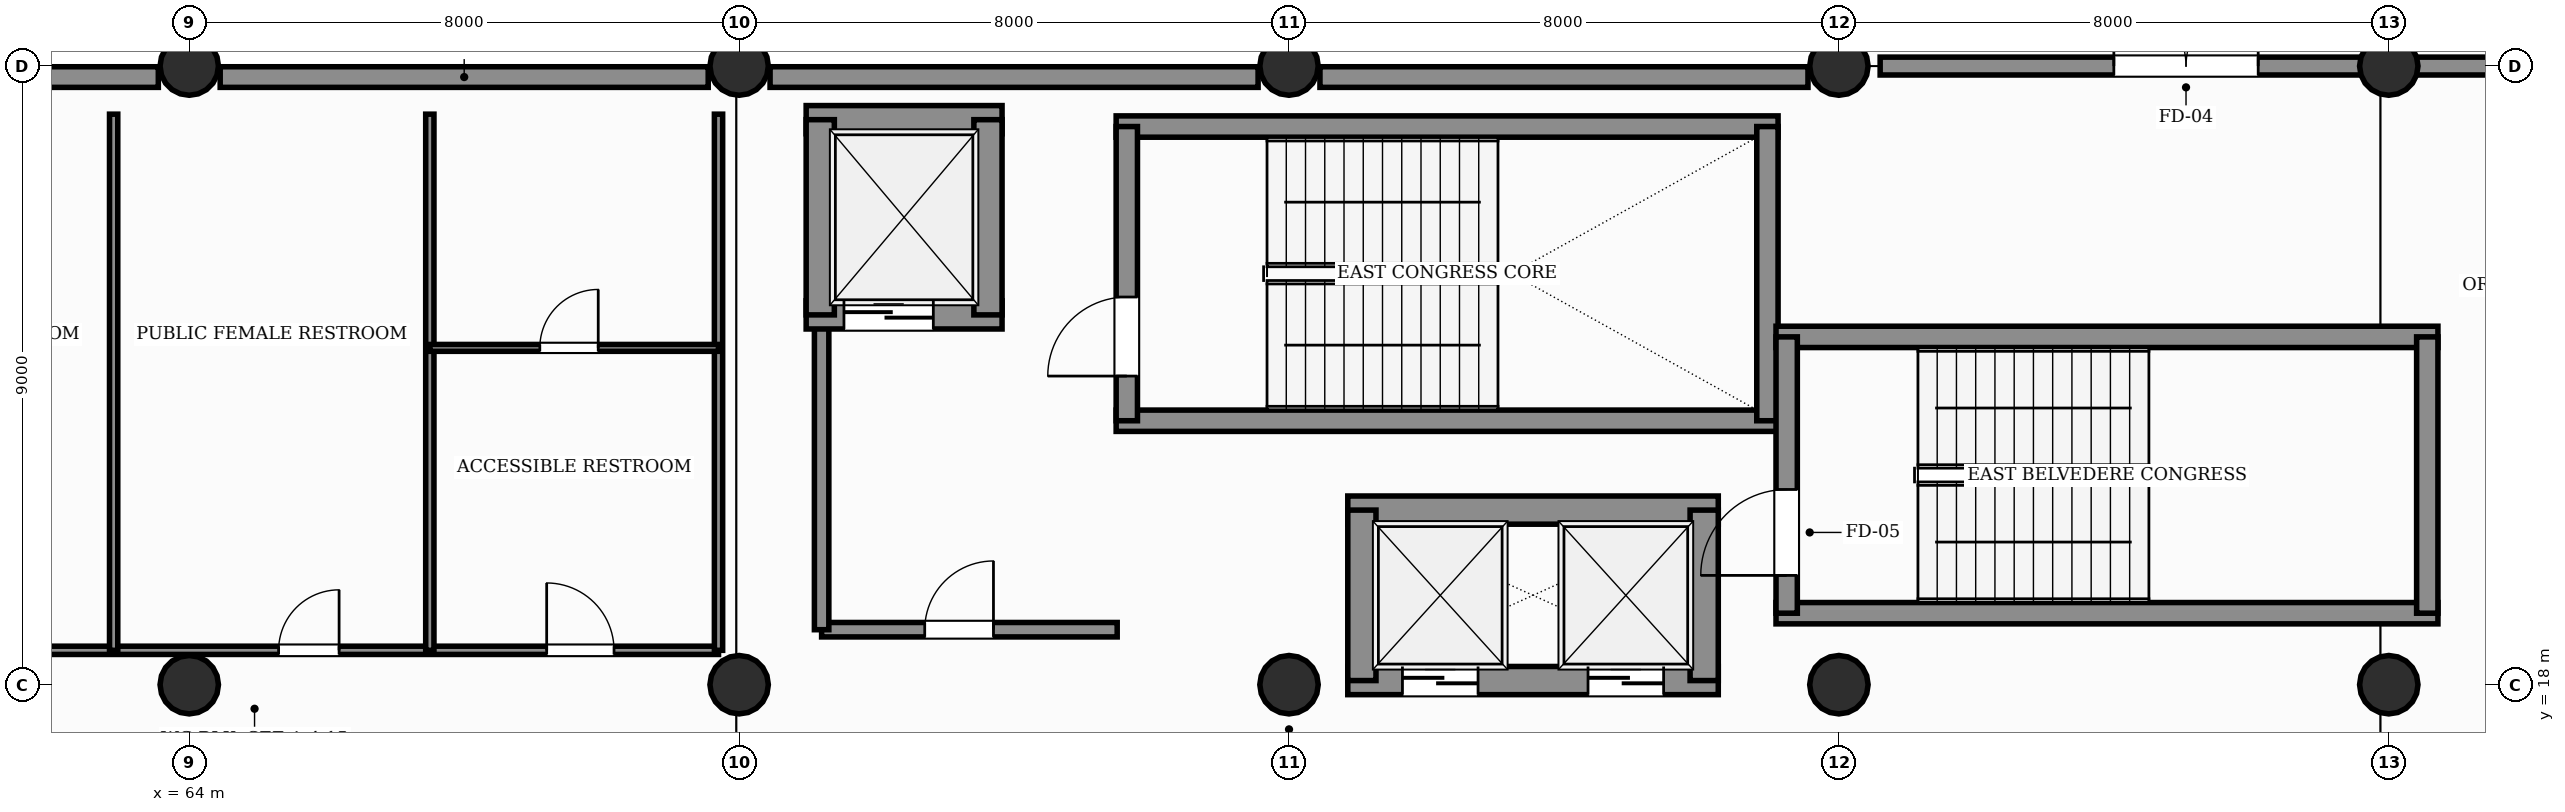
"""IFC4 building model, lengths in metres.
Left out: names, types, materials, properties, quantities, classifications, styles, units other than length and angle.
Written with IfcOpenShell. Run it as: python <this file> out.ifc"""

import sys

from ifc_helpers import new_model, si_unit, direction, frame, frame_2d, origin, origin_2d, place, context, subcontext, project, spatial, rectangle, circle, extrude, element, fill, save


model = new_model("IFC4")
c1 = context("Model", 3, precision=1e-05, world=origin(), true_north=direction((0.0, 1.0)))
c2 = subcontext(c1, "Body", "Model", "MODEL_VIEW")
j1 = project(units=[si_unit("LENGTHUNIT", "METRE"), si_unit("PLANEANGLEUNIT", "RADIAN")], contexts=[c1])
p1 = place(None, origin())
s1 = spatial("IfcSite", under=j1, at=p1, CompositionType="ELEMENT")
p2 = place(p1, origin())
s2 = spatial("IfcBuilding", under=s1, at=p2, CompositionType="ELEMENT")
p3 = place(p2, frame((0.0, 0.0, 11.4)))
s3 = spatial("IfcBuildingStorey", under=s2, at=p3, CompositionType="ELEMENT", Elevation=11.4)
for number, where, z_axis, x_axis in (
    (1, (64.0, 18.0, 0.0), (0.0, 0.0, 1.0), (1.0, 0.0, 0.0)),
    (2, (64.0, 27.0, 0.0), (0.0, 0.0, 1.0), (1.0, 0.0, 0.0)),
    (3, (72.0, 18.0, 0.0), (0.0, 0.0, 1.0), (1.0, 0.0, 0.0)),
    (4, (72.0, 27.0, 0.0), (0.0, 0.0, 1.0), (1.0, 0.0, 0.0)),
    (5, (80.0, 18.0, 0.0), (0.0, 0.0, 1.0), (1.0, 0.0, 0.0)),
    (6, (80.0, 27.0, 0.0), (0.0, 0.0, 1.0), (1.0, 0.0, 0.0)),
    (7, (88.0, 18.0, 0.0), (0.0, 0.0, 1.0), (1.0, 0.0, 0.0)),
    (8, (88.0, 27.0, 0.0), (0.0, 0.0, 1.0), (1.0, 0.0, 0.0)),
    (9, (96.0, 18.0, 0.0), (0.0, 0.0, 1.0), (1.0, 0.0, 0.0)),
    (10, (96.0, 27.0, 0.0), (0.0, 0.0, 1.0), (1.0, 0.0, 0.0)),
):
    element("IfcColumn", number, at=place(p3, frame(where, z_axis=z_axis, x_axis=x_axis)), inside=s3, PredefinedType="COLUMN", context=c2, shape_type="SweptSolid", body=[
        extrude(circle(Radius=0.425, at=origin_2d()), origin(), (0.0, 0.0, 1.0), 4.8),
    ])
for number, where, z_axis, x_axis in (
    (11, (56.45, 26.84, 0.0), (0.0, 0.0, 1.0), (1.0, 0.0, 0.0)),
    (12, (64.45, 26.84, 0.0), (0.0, 0.0, 1.0), (1.0, 0.0, 0.0)),
    (13, (72.45, 26.84, 0.0), (0.0, 0.0, 1.0), (1.0, 0.0, 0.0)),
    (14, (80.45, 26.84, 0.0), (0.0, 0.0, 1.0), (1.0, 0.0, 0.0)),
):
    element("IfcWall", number, at=place(p3, frame(where, z_axis=z_axis, x_axis=x_axis)), inside=s3, PredefinedType="SOLIDWALL", context=c2, shape_type="SweptSolid", body=[
        extrude(rectangle(XDim=7.1, YDim=0.3, at=frame_2d((3.55, 0.0))), origin(), (0.0, 0.0, 1.0), 3.59),
    ])
for number, where, z_axis, x_axis in (
    (15, (77.485, 21.84, 0.0), (0.0, 0.0, 1.0), (1.0, 0.0, 0.0)),
    (16, (77.485, 26.12, 0.0), (0.0, 0.0, 1.0), (1.0, 0.0, 0.0)),
):
    element("IfcWall", number, at=place(p3, frame(where, z_axis=z_axis, x_axis=x_axis)), inside=s3, PredefinedType="SHEAR", context=c2, shape_type="SweptSolid", body=[
        extrude(rectangle(XDim=9.63, YDim=0.31, at=frame_2d((4.815, 0.0))), origin(), (0.0, 0.0, 1.0), 4.8),
    ])
p4 = place(p3, frame((77.64, 21.84, 0.0), z_axis=(0.0, 0.0, 1.0), x_axis=(0.0, 1.0, 0.0)))
e17 = element("IfcWall", 17, at=p4, inside=s3, PredefinedType="SHEAR", context=c2, shape_type="SweptSolid", body=[
    extrude(rectangle(XDim=4.28, YDim=0.31, at=frame_2d((2.14, 0.0))), origin(), (0.0, 0.0, 1.0), 4.8),
])
p5 = place(p4, frame((0.65, 0.0, 0.0)))
e18 = element("IfcOpeningElement", 18, at=p5, cuts=e17, PredefinedType="OPENING", context=c2, shape_type="SweptSolid", body=[
    extrude(rectangle(XDim=1.15, YDim=2.2, at=frame_2d((0.575, 1.1))), frame((0.0, 0.165, 0.0), z_axis=(0.0, -1.0, 0.0), x_axis=(1.0, 0.0, 0.0)), (0.0, 0.0, 1.0), 0.33),
])
p6 = place(p3, frame((86.96, 21.84, 0.0), z_axis=(0.0, 0.0, 1.0), x_axis=(0.0, 1.0, 0.0)))
e19 = element("IfcWall", 19, at=p6, inside=s3, PredefinedType="SHEAR", context=c2, shape_type="SweptSolid", body=[
    extrude(rectangle(XDim=4.28, YDim=0.31, at=frame_2d((2.14, 0.0))), origin(), (0.0, 0.0, 1.0), 4.8),
])
p7 = place(p3, frame((73.2, 18.8, 0.0), z_axis=(0.0, 0.0, 1.0), x_axis=(1.0, 0.0, 0.0)))
e20 = element("IfcWall", 20, at=p7, inside=s3, PredefinedType="PARTITIONING", context=c2, shape_type="SweptSolid", body=[
    extrude(rectangle(XDim=4.3, YDim=0.21, at=frame_2d((2.15, 0.0))), origin(), (0.0, 0.0, 1.0), 3.4),
])
p8 = place(p7, frame((1.5, 0.0, 0.0)))
e21 = element("IfcOpeningElement", 21, at=p8, cuts=e20, PredefinedType="OPENING", context=c2, shape_type="SweptSolid", body=[
    extrude(rectangle(XDim=1.0, YDim=2.15, at=frame_2d((0.5, 1.075))), frame((0.0, 0.115, 0.0), z_axis=(0.0, -1.0, 0.0), x_axis=(1.0, 0.0, 0.0)), (0.0, 0.0, 1.0), 0.23),
])
p9 = place(p3, frame((73.2, 18.8, 0.0), z_axis=(0.0, 0.0, 1.0), x_axis=(0.0, 1.0, 0.0)))
e22 = element("IfcWall", 22, at=p9, inside=s3, PredefinedType="PARTITIONING", context=c2, shape_type="SweptSolid", body=[
    extrude(rectangle(XDim=4.6, YDim=0.21, at=frame_2d((2.3, 0.0))), origin(), (0.0, 0.0, 1.0), 3.4),
])
p10 = place(p3, frame((72.975, 23.38, 0.0), z_axis=(0.0, 0.0, 1.0), x_axis=(1.0, 0.0, 0.0)))
e23 = element("IfcWall", 23, at=p10, inside=s3, PredefinedType="SHEAR", context=c2, shape_type="SweptSolid", body=[
    extrude(rectangle(XDim=2.85, YDim=0.41, at=frame_2d((1.425, 0.0))), origin(), (0.0, 0.0, 1.0), 4.8),
])
p11 = place(p10, frame((0.55, 0.0, 0.0)))
e24 = element("IfcOpeningElement", 24, at=p11, cuts=e23, PredefinedType="OPENING", context=c2, shape_type="SweptSolid", body=[
    extrude(rectangle(XDim=1.3, YDim=2.25, at=frame_2d((0.65, 1.125))), frame((0.0, 0.215, 0.0), z_axis=(0.0, -1.0, 0.0), x_axis=(1.0, 0.0, 0.0)), (0.0, 0.0, 1.0), 0.43),
])
p12 = place(p3, frame((72.975, 26.22, 0.0), z_axis=(0.0, 0.0, 1.0), x_axis=(1.0, 0.0, 0.0)))
e25 = element("IfcWall", 25, at=p12, inside=s3, PredefinedType="SHEAR", context=c2, shape_type="SweptSolid", body=[
    extrude(rectangle(XDim=2.85, YDim=0.41, at=frame_2d((1.425, 0.0))), origin(), (0.0, 0.0, 1.0), 4.8),
])
for number, where, z_axis, x_axis in (
    (26, (73.18, 23.38, 0.0), (0.0, 0.0, 1.0), (0.0, 1.0, 0.0)),
    (27, (75.62, 23.38, 0.0), (0.0, 0.0, 1.0), (0.0, 1.0, 0.0)),
):
    element("IfcWall", number, at=place(p3, frame(where, z_axis=z_axis, x_axis=x_axis)), inside=s3, PredefinedType="SHEAR", context=c2, shape_type="SweptSolid", body=[
        extrude(rectangle(XDim=2.84, YDim=0.41, at=frame_2d((1.42, 0.0))), origin(), (0.0, 0.0, 1.0), 4.8),
    ])
p13 = place(p3, frame((80.855, 18.06, 0.0), z_axis=(0.0, 0.0, 1.0), x_axis=(1.0, 0.0, 0.0)))
e28 = element("IfcWall", 28, at=p13, inside=s3, PredefinedType="SHEAR", context=c2, shape_type="SweptSolid", body=[
    extrude(rectangle(XDim=5.39, YDim=0.41, at=frame_2d((2.695, 0.0))), origin(), (0.0, 0.0, 1.0), 4.8),
])
p14 = place(p13, frame((0.795, 0.0, 0.0)))
e29 = element("IfcOpeningElement", 29, at=p14, cuts=e28, PredefinedType="OPENING", context=c2, shape_type="SweptSolid", body=[
    extrude(rectangle(XDim=1.1, YDim=2.2, at=frame_2d((0.55, 1.1))), frame((0.0, 0.215, 0.0), z_axis=(0.0, -1.0, 0.0), x_axis=(1.0, 0.0, 0.0)), (0.0, 0.0, 1.0), 0.43),
])
p15 = place(p13, frame((3.495, 0.0, 0.0)))
e30 = element("IfcOpeningElement", 30, at=p15, cuts=e28, PredefinedType="OPENING", context=c2, shape_type="SweptSolid", body=[
    extrude(rectangle(XDim=1.1, YDim=2.2, at=frame_2d((0.55, 1.1))), frame((0.0, 0.215, 0.0), z_axis=(0.0, -1.0, 0.0), x_axis=(1.0, 0.0, 0.0)), (0.0, 0.0, 1.0), 0.43),
])
p16 = place(p3, frame((80.855, 20.54, 0.0), z_axis=(0.0, 0.0, 1.0), x_axis=(1.0, 0.0, 0.0)))
e31 = element("IfcWall", 31, at=p16, inside=s3, PredefinedType="SHEAR", context=c2, shape_type="SweptSolid", body=[
    extrude(rectangle(XDim=5.39, YDim=0.41, at=frame_2d((2.695, 0.0))), origin(), (0.0, 0.0, 1.0), 4.8),
])
for number, where, z_axis, x_axis in (
    (32, (81.06, 18.06, 0.0), (0.0, 0.0, 1.0), (0.0, 1.0, 0.0)),
    (33, (86.04, 18.06, 0.0), (0.0, 0.0, 1.0), (0.0, 1.0, 0.0)),
):
    element("IfcWall", number, at=place(p3, frame(where, z_axis=z_axis, x_axis=x_axis)), inside=s3, PredefinedType="SHEAR", context=c2, shape_type="SweptSolid", body=[
        extrude(rectangle(XDim=2.48, YDim=0.41, at=frame_2d((1.24, 0.0))), origin(), (0.0, 0.0, 1.0), 4.8),
    ])
for number, where, z_axis, x_axis in (
    (34, (87.085, 19.04, 0.0), (0.0, 0.0, 1.0), (1.0, 0.0, 0.0)),
    (35, (87.085, 23.06, 0.0), (0.0, 0.0, 1.0), (1.0, 0.0, 0.0)),
):
    element("IfcWall", number, at=place(p3, frame(where, z_axis=z_axis, x_axis=x_axis)), inside=s3, PredefinedType="SHEAR", context=c2, shape_type="SweptSolid", body=[
        extrude(rectangle(XDim=9.63, YDim=0.31, at=frame_2d((4.815, 0.0))), origin(), (0.0, 0.0, 1.0), 4.8),
    ])
p17 = place(p3, frame((87.24, 19.04, 0.0), z_axis=(0.0, 0.0, 1.0), x_axis=(0.0, 1.0, 0.0)))
e36 = element("IfcWall", 36, at=p17, inside=s3, PredefinedType="SHEAR", context=c2, shape_type="SweptSolid", body=[
    extrude(rectangle(XDim=4.02, YDim=0.31, at=frame_2d((2.01, 0.0))), origin(), (0.0, 0.0, 1.0), 4.8),
])
p18 = place(p17, frame((0.55, 0.0, 0.0)))
e37 = element("IfcOpeningElement", 37, at=p18, cuts=e36, PredefinedType="OPENING", context=c2, shape_type="SweptSolid", body=[
    extrude(rectangle(XDim=1.25, YDim=2.2, at=frame_2d((0.625, 1.1))), frame((0.0, 0.165, 0.0), z_axis=(0.0, -1.0, 0.0), x_axis=(1.0, 0.0, 0.0)), (0.0, 0.0, 1.0), 0.33),
])
p19 = place(p3, frame((96.56, 19.04, 0.0), z_axis=(0.0, 0.0, 1.0), x_axis=(0.0, 1.0, 0.0)))
e38 = element("IfcWall", 38, at=p19, inside=s3, PredefinedType="SHEAR", context=c2, shape_type="SweptSolid", body=[
    extrude(rectangle(XDim=4.02, YDim=0.31, at=frame_2d((2.01, 0.0))), origin(), (0.0, 0.0, 1.0), 4.8),
])
p20 = place(p3, frame((58.3, 18.5, 0.0), z_axis=(0.0, 0.0, 1.0), x_axis=(1.0, 0.0, 0.0)))
e39 = element("IfcWall", 39, at=p20, inside=s3, PredefinedType="PARTITIONING", context=c2, shape_type="SweptSolid", body=[
    extrude(rectangle(XDim=13.4, YDim=0.12, at=frame_2d((6.7, 0.0))), origin(), (0.0, 0.0, 1.0), 3.4),
])
p21 = place(p20, frame((1.8, 0.0, 0.0)))
e40 = element("IfcOpeningElement", 40, at=p21, cuts=e39, PredefinedType="OPENING", context=c2, shape_type="SweptSolid", body=[
    extrude(rectangle(XDim=0.88, YDim=2.1, at=frame_2d((0.44, 1.05))), frame((0.0, 0.07, 0.0), z_axis=(0.0, -1.0, 0.0), x_axis=(1.0, 0.0, 0.0)), (0.0, 0.0, 1.0), 0.14),
])
p22 = place(p20, frame((7.0, 0.0, 0.0)))
e41 = element("IfcOpeningElement", 41, at=p22, cuts=e39, PredefinedType="OPENING", context=c2, shape_type="SweptSolid", body=[
    extrude(rectangle(XDim=0.88, YDim=2.1, at=frame_2d((0.44, 1.05))), frame((0.0, 0.07, 0.0), z_axis=(0.0, -1.0, 0.0), x_axis=(1.0, 0.0, 0.0)), (0.0, 0.0, 1.0), 0.14),
])
p23 = place(p20, frame((10.9, 0.0, 0.0)))
e42 = element("IfcOpeningElement", 42, at=p23, cuts=e39, PredefinedType="OPENING", context=c2, shape_type="SweptSolid", body=[
    extrude(rectangle(XDim=0.98, YDim=2.15, at=frame_2d((0.49, 1.075))), frame((0.0, 0.07, 0.0), z_axis=(0.0, -1.0, 0.0), x_axis=(1.0, 0.0, 0.0)), (0.0, 0.0, 1.0), 0.14),
])
for number, where, z_axis, x_axis in (
    (43, (62.9, 18.5, 0.0), (0.0, 0.0, 1.0), (0.0, 1.0, 0.0)),
    (44, (67.5, 18.5, 0.0), (0.0, 0.0, 1.0), (0.0, 1.0, 0.0)),
    (45, (71.7, 18.5, 0.0), (0.0, 0.0, 1.0), (0.0, 1.0, 0.0)),
):
    element("IfcWall", number, at=place(p3, frame(where, z_axis=z_axis, x_axis=x_axis)), inside=s3, PredefinedType="PARTITIONING", context=c2, shape_type="SweptSolid", body=[
        extrude(rectangle(XDim=7.8, YDim=0.12, at=frame_2d((3.9, 0.0))), origin(), (0.0, 0.0, 1.0), 3.4),
    ])
p24 = place(p3, frame((67.5, 22.9, 0.0), z_axis=(0.0, 0.0, 1.0), x_axis=(1.0, 0.0, 0.0)))
e46 = element("IfcWall", 46, at=p24, inside=s3, PredefinedType="PARTITIONING", context=c2, shape_type="SweptSolid", body=[
    extrude(rectangle(XDim=4.2, YDim=0.1, at=frame_2d((2.1, 0.0))), origin(), (0.0, 0.0, 1.0), 3.4),
])
p25 = place(p24, frame((1.6, 0.0, 0.0)))
e47 = element("IfcOpeningElement", 47, at=p25, cuts=e46, PredefinedType="OPENING", context=c2, shape_type="SweptSolid", body=[
    extrude(rectangle(XDim=0.85, YDim=2.1, at=frame_2d((0.425, 1.05))), frame((0.0, 0.06, 0.0), z_axis=(0.0, -1.0, 0.0), x_axis=(1.0, 0.0, 0.0)), (0.0, 0.0, 1.0), 0.12),
])
p26 = place(p3, frame((88.6, 27.0, 0.0), z_axis=(0.0, 0.0, 1.0), x_axis=(1.0, 0.0, 0.0)))
e48 = element("IfcWall", 48, at=p26, inside=s3, PredefinedType="SOLIDWALL", context=c2, shape_type="SweptSolid", body=[
    extrude(rectangle(XDim=14.9, YDim=0.26, at=frame_2d((7.45, 0.0))), origin(), (0.0, 0.0, 1.0), 4.8),
])
p27 = place(p26, frame((3.4, 0.0, 0.0)))
e49 = element("IfcOpeningElement", 49, at=p27, cuts=e48, PredefinedType="OPENING", context=c2, shape_type="SweptSolid", body=[
    extrude(rectangle(XDim=2.1, YDim=2.4, at=frame_2d((1.05, 1.2))), frame((0.0, 0.14, 0.0), z_axis=(0.0, -1.0, 0.0), x_axis=(1.0, 0.0, 0.0)), (0.0, 0.0, 1.0), 0.28),
])
p28 = place(p26, frame((10.4, 0.0, 0.0)))
e50 = element("IfcOpeningElement", 50, at=p28, cuts=e48, PredefinedType="OPENING", context=c2, shape_type="SweptSolid", body=[
    extrude(rectangle(XDim=2.05, YDim=2.5, at=frame_2d((1.025, 1.25))), frame((0.0, 0.14, 0.0), z_axis=(0.0, -1.0, 0.0), x_axis=(1.0, 0.0, 0.0)), (0.0, 0.0, 1.0), 0.28),
])
p29 = place(p5, origin())
e51 = element("IfcDoor", 51, at=p29, inside=s3, OperationType="SINGLE_SWING_LEFT", PredefinedType="DOOR", context=c2, shape_type="SweptSolid", body=[
    extrude(rectangle(XDim=1.15, YDim=2.2, at=frame_2d((0.575, 1.1))), frame((0.0, 0.025, 0.0), z_axis=(0.0, -1.0, 0.0), x_axis=(1.0, 0.0, 0.0)), (0.0, 0.0, 1.0), 0.05),
])
fill(e18, e51)
p30 = place(p8, origin())
e52 = element("IfcDoor", 52, at=p30, inside=s3, OperationType="SINGLE_SWING_RIGHT", PredefinedType="DOOR", context=c2, shape_type="SweptSolid", body=[
    extrude(rectangle(XDim=1.0, YDim=2.15, at=frame_2d((0.5, 1.075))), frame((0.0, 0.025, 0.0), z_axis=(0.0, -1.0, 0.0), x_axis=(1.0, 0.0, 0.0)), (0.0, 0.0, 1.0), 0.05),
])
fill(e21, e52)
p31 = place(p11, origin())
e53 = element("IfcDoor", 53, at=p31, inside=s3, OperationType="DOUBLE_DOOR_SLIDING", PredefinedType="DOOR", context=c2, shape_type="SweptSolid", body=[
    extrude(rectangle(XDim=1.3, YDim=2.25, at=frame_2d((0.65, 1.125))), frame((0.0, 0.025, 0.0), z_axis=(0.0, -1.0, 0.0), x_axis=(1.0, 0.0, 0.0)), (0.0, 0.0, 1.0), 0.05),
])
fill(e24, e53)
p32 = place(p14, origin())
e54 = element("IfcDoor", 54, at=p32, inside=s3, OperationType="DOUBLE_DOOR_SLIDING", PredefinedType="DOOR", context=c2, shape_type="SweptSolid", body=[
    extrude(rectangle(XDim=1.1, YDim=2.2, at=frame_2d((0.55, 1.1))), frame((0.0, 0.025, 0.0), z_axis=(0.0, -1.0, 0.0), x_axis=(1.0, 0.0, 0.0)), (0.0, 0.0, 1.0), 0.05),
])
fill(e29, e54)
p33 = place(p15, origin())
e55 = element("IfcDoor", 55, at=p33, inside=s3, OperationType="DOUBLE_DOOR_SLIDING", PredefinedType="DOOR", context=c2, shape_type="SweptSolid", body=[
    extrude(rectangle(XDim=1.1, YDim=2.2, at=frame_2d((0.55, 1.1))), frame((0.0, 0.025, 0.0), z_axis=(0.0, -1.0, 0.0), x_axis=(1.0, 0.0, 0.0)), (0.0, 0.0, 1.0), 0.05),
])
fill(e30, e55)
p34 = place(p18, origin())
e56 = element("IfcDoor", 56, at=p34, inside=s3, OperationType="SINGLE_SWING_LEFT", PredefinedType="DOOR", context=c2, shape_type="SweptSolid", body=[
    extrude(rectangle(XDim=1.25, YDim=2.2, at=frame_2d((0.625, 1.1))), frame((0.0, 0.025, 0.0), z_axis=(0.0, -1.0, 0.0), x_axis=(1.0, 0.0, 0.0)), (0.0, 0.0, 1.0), 0.05),
])
fill(e37, e56)
p35 = place(p22, origin())
e57 = element("IfcDoor", 57, at=p35, inside=s3, OperationType="SINGLE_SWING_RIGHT", PredefinedType="DOOR", context=c2, shape_type="SweptSolid", body=[
    extrude(rectangle(XDim=0.88, YDim=2.1, at=frame_2d((0.44, 1.05))), frame((0.0, 0.025, 0.0), z_axis=(0.0, -1.0, 0.0), x_axis=(1.0, 0.0, 0.0)), (0.0, 0.0, 1.0), 0.05),
])
fill(e41, e57)
p36 = place(p23, origin())
e58 = element("IfcDoor", 58, at=p36, inside=s3, OperationType="SINGLE_SWING_LEFT", PredefinedType="DOOR", context=c2, shape_type="SweptSolid", body=[
    extrude(rectangle(XDim=0.98, YDim=2.15, at=frame_2d((0.49, 1.075))), frame((0.0, 0.025, 0.0), z_axis=(0.0, -1.0, 0.0), x_axis=(1.0, 0.0, 0.0)), (0.0, 0.0, 1.0), 0.05),
])
fill(e42, e58)
p37 = place(p25, origin())
e59 = element("IfcDoor", 59, at=p37, inside=s3, OperationType="SINGLE_SWING_RIGHT", PredefinedType="DOOR", context=c2, shape_type="SweptSolid", body=[
    extrude(rectangle(XDim=0.85, YDim=2.1, at=frame_2d((0.425, 1.05))), frame((0.0, 0.025, 0.0), z_axis=(0.0, -1.0, 0.0), x_axis=(1.0, 0.0, 0.0)), (0.0, 0.0, 1.0), 0.05),
])
fill(e47, e59)
p38 = place(p27, origin())
e60 = element("IfcDoor", 60, at=p38, inside=s3, OperationType="DOUBLE_DOOR_SINGLE_SWING", PredefinedType="DOOR", context=c2, shape_type="SweptSolid", body=[
    extrude(rectangle(XDim=2.1, YDim=2.4, at=frame_2d((1.05, 1.2))), frame((0.0, 0.025, 0.0), z_axis=(0.0, -1.0, 0.0), x_axis=(1.0, 0.0, 0.0)), (0.0, 0.0, 1.0), 0.05),
])
fill(e49, e60)
save(model, sys.argv[1])
